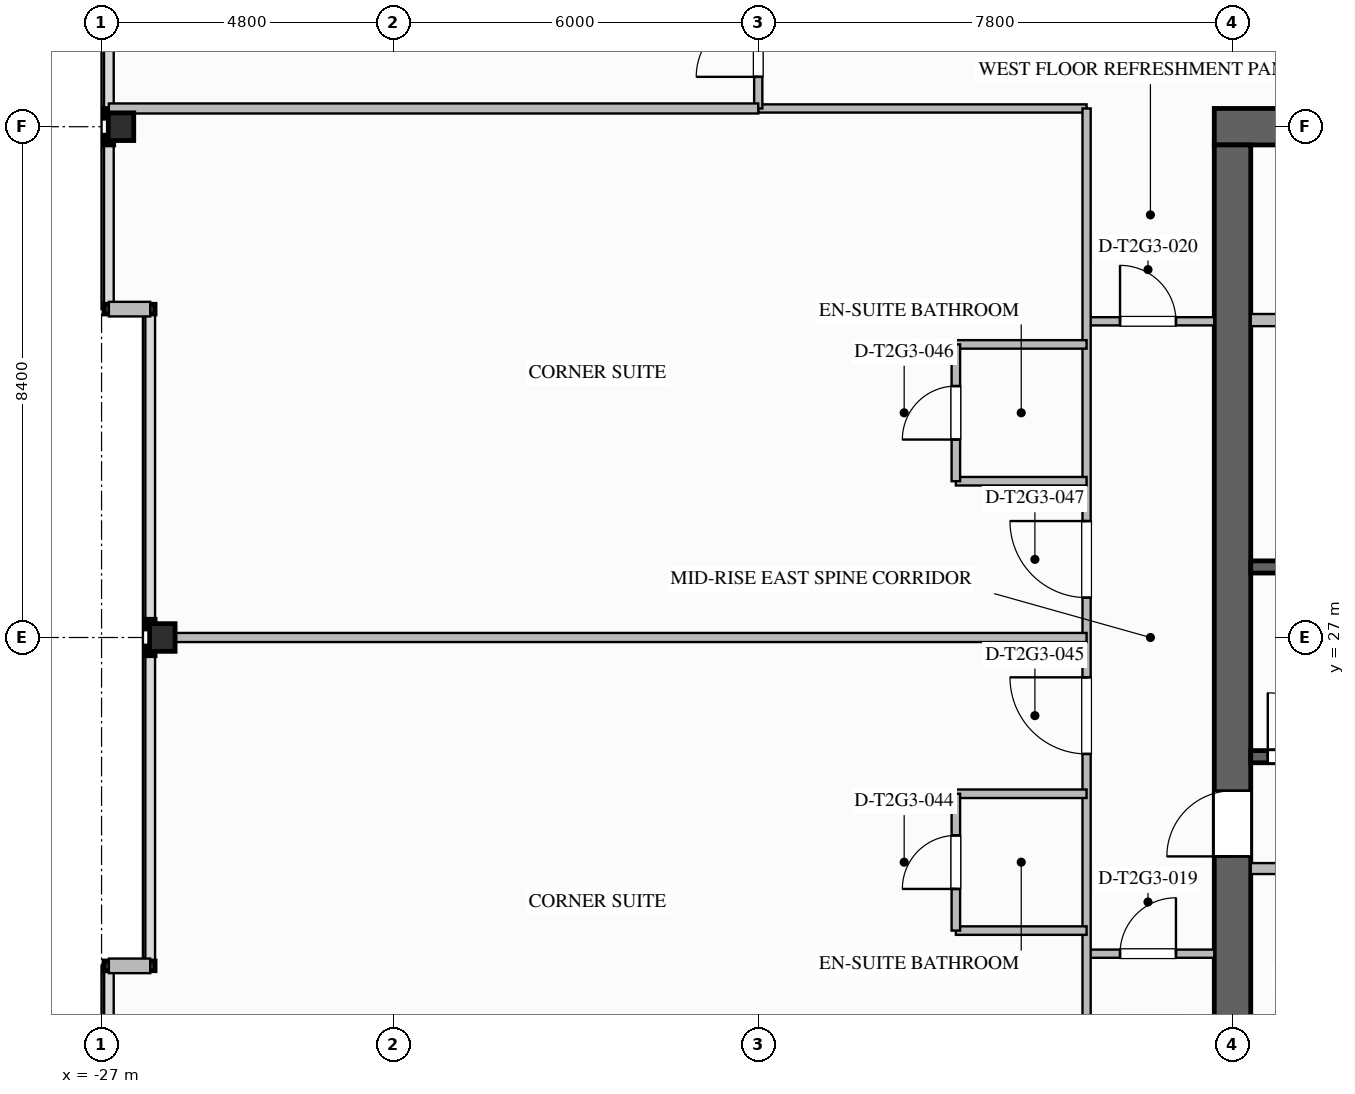
"""IFC4 building model, lengths in metres.
Left out: names, types, materials, properties, quantities, classifications, styles, units other than length and angle.
Written with IfcOpenShell. Run it as: python <this file> out.ifc"""

import sys

from ifc_helpers import new_model, si_unit, direction, frame, frame_2d, origin, origin_2d, place, context, subcontext, project, spatial, rectangle, i_section, extrude, element, fill, save


model = new_model("IFC4")
c1 = context("Model", 3, precision=1e-05, world=origin(), true_north=direction((0.0, 1.0)))
c2 = subcontext(c1, "Body", "Model", "MODEL_VIEW")
j1 = project(units=[si_unit("LENGTHUNIT", "METRE"), si_unit("PLANEANGLEUNIT", "RADIAN")], contexts=[c1])
p1 = place(None, origin())
s1 = spatial("IfcSite", under=j1, at=p1, CompositionType="ELEMENT")
p2 = place(p1, origin())
s2 = spatial("IfcBuilding", under=s1, at=p2, CompositionType="ELEMENT")
p3 = place(p2, frame((0.0, 0.0, 112.8)))
s3 = spatial("IfcBuildingStorey", under=s2, at=p3, CompositionType="ELEMENT", Elevation=112.8)
p4 = place(p3, frame((-8.7, 35.4, 0.0), z_axis=(0.0, 0.0, 1.0), x_axis=(1.0, 0.0, 0.0)))
e1 = element("IfcWall", 1, at=p4, inside=s3, PredefinedType="SHEAR", context=c2, shape_type="SweptSolid", body=[
    extrude(rectangle(XDim=17.4, YDim=0.6, at=frame_2d((8.7, 0.0))), origin(), (0.0, 0.0, 1.0), 3.5),
])
p5 = place(p3, frame((-8.4, 18.9, 0.0), z_axis=(0.0, 0.0, 1.0), x_axis=(0.0, 1.0, 0.0)))
e2 = element("IfcWall", 2, at=p5, inside=s3, PredefinedType="SHEAR", context=c2, shape_type="SweptSolid", body=[
    extrude(rectangle(XDim=16.2, YDim=0.6, at=frame_2d((8.1, 0.0))), origin(), (0.0, 0.0, 1.0), 3.5),
])
p6 = place(p5, frame((4.5, 0.0, 0.0)))
e3 = element("IfcOpeningElement", 3, at=p6, cuts=e2, PredefinedType="OPENING", context=c2, shape_type="SweptSolid", body=[
    extrude(rectangle(XDim=1.08, YDim=2.04, at=frame_2d((0.54, 1.02))), frame((0.0, 0.31, 0.0), z_axis=(0.0, -1.0, 0.0), x_axis=(1.0, 0.0, 0.0)), (0.0, 0.0, 1.0), 0.62),
])
for number, where, z_axis, x_axis in (
    (4, (-26.0, 27.0, 0.0), (0.0, 0.0, 1.0), (1.0, 0.0, 0.0)),
    (5, (-26.68, 35.4, 0.0), (0.0, 0.0, 1.0), (1.0, 0.0, 0.0)),
):
    element("IfcColumn", number, at=place(p3, frame(where, z_axis=z_axis, x_axis=x_axis)), inside=s3, PredefinedType="COLUMN", context=c2, shape_type="SweptSolid", body=[
        extrude(i_section(OverallWidth=0.418, OverallDepth=0.455, WebThickness=0.042, FlangeThickness=0.068, FilletRadius=0.03, at=origin_2d()), origin(), (0.0, 0.0, 1.0), 3.497),
    ])
for number, where, z_axis, x_axis in (
    (6, (-26.88, 21.6, 0.0), (0.0, 0.0, 1.0), (1.0, 0.0, 0.0)),
    (7, (-26.2, 32.4, 0.0), (0.0, 0.0, 1.0), (-1.0, 0.0, 0.0)),
):
    element("IfcWall", number, at=place(p3, frame(where, z_axis=z_axis, x_axis=x_axis)), inside=s3, PredefinedType="STANDARD", context=c2, shape_type="SweptSolid", body=[
        extrude(rectangle(XDim=0.68, YDim=0.24, at=frame_2d((0.34, 0.0))), origin(), (0.0, 0.0, 1.0), 3.24),
    ])
p7 = place(p3, frame((-8.1, 25.04, 0.0), z_axis=(0.0, 0.0, 1.0), x_axis=(1.0, 0.0, 0.0)))
e8 = element("IfcWall", 8, at=p7, inside=s3, PredefinedType="SOLIDWALL", context=c2, shape_type="SweptSolid", body=[
    extrude(rectangle(XDim=8.1, YDim=0.2, at=frame_2d((4.05, 0.0))), origin(), (0.0, 0.0, 1.0), 3.24),
])
p8 = place(p7, frame((0.28, 0.0, 0.0)))
e9 = element("IfcOpeningElement", 9, at=p8, cuts=e8, PredefinedType="OPENING", context=c2, shape_type="SweptSolid", body=[
    extrude(rectangle(XDim=1.05, YDim=2.1, at=frame_2d((0.525, 1.05))), frame((0.0, 0.11, 0.0), z_axis=(0.0, -1.0, 0.0), x_axis=(1.0, 0.0, 0.0)), (0.0, 0.0, 1.0), 0.22),
])
p9 = place(p3, frame((-8.1, 28.16, 0.0), z_axis=(0.0, 0.0, 1.0), x_axis=(1.0, 0.0, 0.0)))
e10 = element("IfcWall", 10, at=p9, inside=s3, PredefinedType="SOLIDWALL", context=c2, shape_type="SweptSolid", body=[
    extrude(rectangle(XDim=8.1, YDim=0.2, at=frame_2d((4.05, 0.0))), origin(), (0.0, 0.0, 1.0), 3.24),
])
p10 = place(p3, frame((-8.1, 32.22, 0.0), z_axis=(0.0, 0.0, 1.0), x_axis=(1.0, 0.0, 0.0)))
e11 = element("IfcWall", 11, at=p10, inside=s3, PredefinedType="SOLIDWALL", context=c2, shape_type="SweptSolid", body=[
    extrude(rectangle(XDim=7.1, YDim=0.2, at=frame_2d((3.55, 0.0))), origin(), (0.0, 0.0, 1.0), 3.24),
])
p11 = place(p3, frame((-8.1, 23.2, 0.0), z_axis=(0.0, 0.0, 1.0), x_axis=(1.0, 0.0, 0.0)))
e12 = element("IfcWall", 12, at=p11, inside=s3, PredefinedType="SOLIDWALL", context=c2, shape_type="SweptSolid", body=[
    extrude(rectangle(XDim=8.65, YDim=0.18, at=frame_2d((4.325, 0.0))), origin(), (0.0, 0.0, 1.0), 3.24),
])
p12 = place(p11, frame((1.0, 0.0, 0.0)))
e13 = element("IfcOpeningElement", 13, at=p12, cuts=e12, PredefinedType="OPENING", context=c2, shape_type="SweptSolid", body=[
    extrude(rectangle(XDim=1.0, YDim=2.1, at=frame_2d((0.5, 1.05))), frame((0.0, 0.1, 0.0), z_axis=(0.0, -1.0, 0.0), x_axis=(1.0, 0.0, 0.0)), (0.0, 0.0, 1.0), 0.2),
])
p13 = place(p11, frame((4.0, 0.0, 0.0)))
e14 = element("IfcOpeningElement", 14, at=p13, cuts=e12, PredefinedType="OPENING", context=c2, shape_type="SweptSolid", body=[
    extrude(rectangle(XDim=1.0, YDim=2.1, at=frame_2d((0.5, 1.05))), frame((0.0, 0.1, 0.0), z_axis=(0.0, -1.0, 0.0), x_axis=(1.0, 0.0, 0.0)), (0.0, 0.0, 1.0), 0.2),
])
p14 = place(p11, frame((6.8, 0.0, 0.0)))
e15 = element("IfcOpeningElement", 15, at=p14, cuts=e12, PredefinedType="OPENING", context=c2, shape_type="SweptSolid", body=[
    extrude(rectangle(XDim=1.0, YDim=2.1, at=frame_2d((0.5, 1.05))), frame((0.0, 0.1, 0.0), z_axis=(0.0, -1.0, 0.0), x_axis=(1.0, 0.0, 0.0)), (0.0, 0.0, 1.0), 0.2),
])
p15 = place(p3, frame((-10.8, 21.8, 0.0), z_axis=(0.0, 0.0, 1.0), x_axis=(1.0, 0.0, 0.0)))
e16 = element("IfcWall", 16, at=p15, inside=s3, PredefinedType="PARTITIONING", context=c2, shape_type="SweptSolid", body=[
    extrude(rectangle(XDim=2.1, YDim=0.135, at=frame_2d((1.05, 0.0))), origin(), (0.0, 0.0, 1.0), 3.24),
])
p16 = place(p15, frame((0.55, 0.0, 0.0)))
e17 = element("IfcOpeningElement", 17, at=p16, cuts=e16, PredefinedType="OPENING", context=c2, shape_type="SweptSolid", body=[
    extrude(rectangle(XDim=0.92, YDim=2.1, at=frame_2d((0.46, 1.05))), frame((0.0, 0.077, 0.0), z_axis=(0.0, -1.0, 0.0), x_axis=(1.0, 0.0, 0.0)), (0.0, 0.0, 1.0), 0.155),
])
p17 = place(p3, frame((-10.8, 32.2, 0.0), z_axis=(0.0, 0.0, 1.0), x_axis=(1.0, 0.0, 0.0)))
e18 = element("IfcWall", 18, at=p17, inside=s3, PredefinedType="PARTITIONING", context=c2, shape_type="SweptSolid", body=[
    extrude(rectangle(XDim=2.1, YDim=0.135, at=frame_2d((1.05, 0.0))), origin(), (0.0, 0.0, 1.0), 3.24),
])
p18 = place(p17, frame((0.55, 0.0, 0.0)))
e19 = element("IfcOpeningElement", 19, at=p18, cuts=e18, PredefinedType="OPENING", context=c2, shape_type="SweptSolid", body=[
    extrude(rectangle(XDim=0.92, YDim=2.1, at=frame_2d((0.46, 1.05))), frame((0.0, 0.077, 0.0), z_axis=(0.0, -1.0, 0.0), x_axis=(1.0, 0.0, 0.0)), (0.0, 0.0, 1.0), 0.155),
])
p19 = place(p3, frame((-16.2, 35.7, 0.0), z_axis=(0.0, 0.0, 1.0), x_axis=(1.0, 0.0, 0.0)))
e20 = element("IfcWall", 20, at=p19, inside=s3, PredefinedType="PARTITIONING", context=c2, shape_type="SweptSolid", body=[
    extrude(rectangle(XDim=5.4, YDim=0.135, at=frame_2d((2.7, 0.0))), origin(), (0.0, 0.0, 1.0), 3.24),
])
p20 = place(p3, frame((-10.8, 18.3, 0.0), z_axis=(0.0, 0.0, 1.0), x_axis=(0.0, 1.0, 0.0)))
e21 = element("IfcWall", 21, at=p20, inside=s3, PredefinedType="PARTITIONING", context=c2, shape_type="SweptSolid", body=[
    extrude(rectangle(XDim=17.4, YDim=0.135, at=frame_2d((8.7, 0.0))), origin(), (0.0, 0.0, 1.0), 3.24),
])
p21 = place(p20, frame((6.785, 0.0, 0.0)))
e22 = element("IfcOpeningElement", 22, at=p21, cuts=e21, PredefinedType="OPENING", context=c2, shape_type="SweptSolid", body=[
    extrude(rectangle(XDim=1.26, YDim=2.2, at=frame_2d((0.63, 1.1))), frame((0.0, 0.077, 0.0), z_axis=(0.0, -1.0, 0.0), x_axis=(1.0, 0.0, 0.0)), (0.0, 0.0, 1.0), 0.155),
])
p22 = place(p20, frame((9.355, 0.0, 0.0)))
e23 = element("IfcOpeningElement", 23, at=p22, cuts=e21, PredefinedType="OPENING", context=c2, shape_type="SweptSolid", body=[
    extrude(rectangle(XDim=1.26, YDim=2.2, at=frame_2d((0.63, 1.1))), frame((0.0, 0.077, 0.0), z_axis=(0.0, -1.0, 0.0), x_axis=(1.0, 0.0, 0.0)), (0.0, 0.0, 1.0), 0.155),
])
p23 = place(p3, frame((-16.2, 35.7, 0.0), z_axis=(0.0, 0.0, 1.0), x_axis=(0.0, 1.0, 0.0)))
e24 = element("IfcWall", 24, at=p23, inside=s3, PredefinedType="PARTITIONING", context=c2, shape_type="SweptSolid", body=[
    extrude(rectangle(XDim=2.75, YDim=0.135, at=frame_2d((1.375, 0.0))), origin(), (0.0, 0.0, 1.0), 2.452),
])
p24 = place(p23, frame((0.52, 0.0, 0.0)))
e25 = element("IfcOpeningElement", 25, at=p24, cuts=e24, PredefinedType="OPENING", context=c2, shape_type="SweptSolid", body=[
    extrude(rectangle(XDim=1.02, YDim=2.15, at=frame_2d((0.51, 1.075))), frame((0.0, 0.077, 0.0), z_axis=(0.0, -1.0, 0.0), x_axis=(1.0, 0.0, 0.0)), (0.0, 0.0, 1.0), 0.155),
])
p25 = place(p3, frame((-26.88, 35.7, 0.0), z_axis=(0.0, 0.0, 1.0), x_axis=(1.0, 0.0, 0.0)))
e26 = element("IfcWall", 26, at=p25, inside=s3, PredefinedType="PARTITIONING", context=c2, shape_type="SweptSolid", body=[
    extrude(rectangle(XDim=10.68, YDim=0.165, at=frame_2d((5.34, 0.0))), origin(), (0.0, 0.0, 1.0), 2.452),
])
p26 = place(p3, frame((-26.2, 27.0, 0.0), z_axis=(0.0, 0.0, 1.0), x_axis=(1.0, 0.0, 0.0)))
e27 = element("IfcWall", 27, at=p26, inside=s3, PredefinedType="PARTITIONING", context=c2, shape_type="SweptSolid", body=[
    extrude(rectangle(XDim=15.4, YDim=0.15, at=frame_2d((7.7, 0.0))), origin(), (0.0, 0.0, 1.0), 2.452),
])
for number, where, z_axis, x_axis in (
    (28, (-10.8, 22.18, 0.0), (0.0, 0.0, 1.0), (-1.0, 0.0, 0.0)),
    (29, (-10.8, 24.43, 0.0), (0.0, 0.0, 1.0), (-1.0, 0.0, 0.0)),
):
    element("IfcWall", number, at=place(p3, frame(where, z_axis=z_axis, x_axis=x_axis)), inside=s3, PredefinedType="PLUMBINGWALL", context=c2, shape_type="SweptSolid", body=[
        extrude(rectangle(XDim=2.15, YDim=0.14, at=frame_2d((1.075, 0.0))), origin(), (0.0, 0.0, 1.0), 3.24),
    ])
p27 = place(p3, frame((-12.95, 22.18, 0.0), z_axis=(0.0, 0.0, 1.0), x_axis=(0.0, 1.0, 0.0)))
e30 = element("IfcWall", 30, at=p27, inside=s3, PredefinedType="PLUMBINGWALL", context=c2, shape_type="SweptSolid", body=[
    extrude(rectangle(XDim=2.25, YDim=0.14, at=frame_2d((1.125, 0.0))), origin(), (0.0, 0.0, 1.0), 3.24),
])
p28 = place(p27, frame((0.685, 0.0, 0.0)))
e31 = element("IfcOpeningElement", 31, at=p28, cuts=e30, PredefinedType="OPENING", context=c2, shape_type="SweptSolid", body=[
    extrude(rectangle(XDim=0.88, YDim=2.1, at=frame_2d((0.44, 1.05))), frame((0.0, 0.08, 0.0), z_axis=(0.0, -1.0, 0.0), x_axis=(1.0, 0.0, 0.0)), (0.0, 0.0, 1.0), 0.16),
])
for number, where, z_axis, x_axis in (
    (32, (-10.8, 29.57, 0.0), (0.0, 0.0, 1.0), (-1.0, 0.0, 0.0)),
    (33, (-10.8, 31.82, 0.0), (0.0, 0.0, 1.0), (-1.0, 0.0, 0.0)),
):
    element("IfcWall", number, at=place(p3, frame(where, z_axis=z_axis, x_axis=x_axis)), inside=s3, PredefinedType="PLUMBINGWALL", context=c2, shape_type="SweptSolid", body=[
        extrude(rectangle(XDim=2.15, YDim=0.14, at=frame_2d((1.075, 0.0))), origin(), (0.0, 0.0, 1.0), 3.24),
    ])
p29 = place(p3, frame((-12.95, 29.57, 0.0), z_axis=(0.0, 0.0, 1.0), x_axis=(0.0, 1.0, 0.0)))
e34 = element("IfcWall", 34, at=p29, inside=s3, PredefinedType="PLUMBINGWALL", context=c2, shape_type="SweptSolid", body=[
    extrude(rectangle(XDim=2.25, YDim=0.14, at=frame_2d((1.125, 0.0))), origin(), (0.0, 0.0, 1.0), 3.24),
])
p30 = place(p29, frame((0.685, 0.0, 0.0)))
e35 = element("IfcOpeningElement", 35, at=p30, cuts=e34, PredefinedType="OPENING", context=c2, shape_type="SweptSolid", body=[
    extrude(rectangle(XDim=0.88, YDim=2.1, at=frame_2d((0.44, 1.05))), frame((0.0, 0.08, 0.0), z_axis=(0.0, -1.0, 0.0), x_axis=(1.0, 0.0, 0.0)), (0.0, 0.0, 1.0), 0.16),
])
p31 = place(p8, origin())
e36 = element("IfcDoor", 36, at=p31, inside=s3, OperationType="SINGLE_SWING_LEFT", PredefinedType="DOOR", context=c2, shape_type="SweptSolid", body=[
    extrude(rectangle(XDim=1.05, YDim=2.1, at=frame_2d((0.525, 1.05))), frame((0.0, 0.025, 0.0), z_axis=(0.0, -1.0, 0.0), x_axis=(1.0, 0.0, 0.0)), (0.0, 0.0, 1.0), 0.05),
])
fill(e9, e36)
p32 = place(p6, origin())
e37 = element("IfcDoor", 37, at=p32, inside=s3, OperationType="SINGLE_SWING_LEFT", PredefinedType="DOOR", context=c2, shape_type="SweptSolid", body=[
    extrude(rectangle(XDim=1.08, YDim=2.04, at=frame_2d((0.54, 1.02))), frame((0.0, 0.025, 0.0), z_axis=(0.0, -1.0, 0.0), x_axis=(1.0, 0.0, 0.0)), (0.0, 0.0, 1.0), 0.05),
])
fill(e3, e37)
p33 = place(p16, origin())
e38 = element("IfcDoor", 38, at=p33, inside=s3, OperationType="SINGLE_SWING_RIGHT", PredefinedType="DOOR", context=c2, shape_type="SweptSolid", body=[
    extrude(rectangle(XDim=0.92, YDim=2.1, at=frame_2d((0.46, 1.05))), frame((0.0, 0.025, 0.0), z_axis=(0.0, -1.0, 0.0), x_axis=(1.0, 0.0, 0.0)), (0.0, 0.0, 1.0), 0.05),
])
fill(e17, e38)
p34 = place(p18, origin())
e39 = element("IfcDoor", 39, at=p34, inside=s3, OperationType="SINGLE_SWING_LEFT", PredefinedType="DOOR", context=c2, shape_type="SweptSolid", body=[
    extrude(rectangle(XDim=0.92, YDim=2.1, at=frame_2d((0.46, 1.05))), frame((0.0, 0.025, 0.0), z_axis=(0.0, -1.0, 0.0), x_axis=(1.0, 0.0, 0.0)), (0.0, 0.0, 1.0), 0.05),
])
fill(e19, e39)
p35 = place(p24, origin())
e40 = element("IfcDoor", 40, at=p35, inside=s3, OperationType="SINGLE_SWING_LEFT", PredefinedType="DOOR", context=c2, shape_type="SweptSolid", body=[
    extrude(rectangle(XDim=1.02, YDim=2.15, at=frame_2d((0.51, 1.075))), frame((0.0, 0.025, 0.0), z_axis=(0.0, -1.0, 0.0), x_axis=(1.0, 0.0, 0.0)), (0.0, 0.0, 1.0), 0.05),
])
fill(e25, e40)
p36 = place(p28, origin())
e41 = element("IfcDoor", 41, at=p36, inside=s3, OperationType="SINGLE_SWING_LEFT", PredefinedType="DOOR", context=c2, shape_type="SweptSolid", body=[
    extrude(rectangle(XDim=0.88, YDim=2.1, at=frame_2d((0.44, 1.05))), frame((0.0, 0.025, 0.0), z_axis=(0.0, -1.0, 0.0), x_axis=(1.0, 0.0, 0.0)), (0.0, 0.0, 1.0), 0.05),
])
fill(e31, e41)
p37 = place(p21, origin())
e42 = element("IfcDoor", 42, at=p37, inside=s3, OperationType="SINGLE_SWING_RIGHT", PredefinedType="DOOR", context=c2, shape_type="SweptSolid", body=[
    extrude(rectangle(XDim=1.26, YDim=2.2, at=frame_2d((0.63, 1.1))), frame((0.0, 0.025, 0.0), z_axis=(0.0, -1.0, 0.0), x_axis=(1.0, 0.0, 0.0)), (0.0, 0.0, 1.0), 0.05),
])
fill(e22, e42)
p38 = place(p30, origin())
e43 = element("IfcDoor", 43, at=p38, inside=s3, OperationType="SINGLE_SWING_LEFT", PredefinedType="DOOR", context=c2, shape_type="SweptSolid", body=[
    extrude(rectangle(XDim=0.88, YDim=2.1, at=frame_2d((0.44, 1.05))), frame((0.0, 0.025, 0.0), z_axis=(0.0, -1.0, 0.0), x_axis=(1.0, 0.0, 0.0)), (0.0, 0.0, 1.0), 0.05),
])
fill(e35, e43)
p39 = place(p22, origin())
e44 = element("IfcDoor", 44, at=p39, inside=s3, OperationType="SINGLE_SWING_RIGHT", PredefinedType="DOOR", context=c2, shape_type="SweptSolid", body=[
    extrude(rectangle(XDim=1.26, YDim=2.2, at=frame_2d((0.63, 1.1))), frame((0.0, 0.025, 0.0), z_axis=(0.0, -1.0, 0.0), x_axis=(1.0, 0.0, 0.0)), (0.0, 0.0, 1.0), 0.05),
])
fill(e23, e44)
save(model, sys.argv[1])
